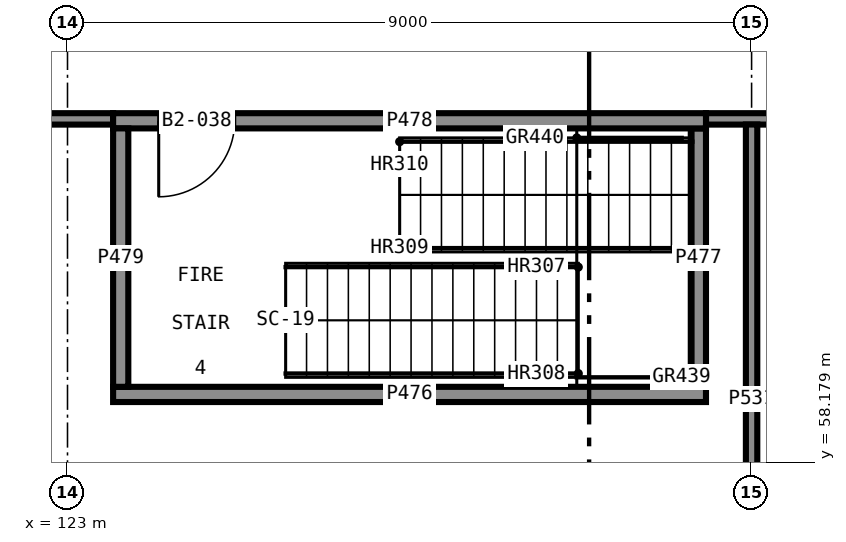
"""IFC4 building model, lengths in metres.
Left out: names, types, materials, properties, quantities, classifications, styles, units other than length and angle.
Written with IfcOpenShell. Run it as: python <this file> out.ifc"""

import sys

from ifc_helpers import new_model, si_unit, direction, frame, frame_2d, origin, place, context, subcontext, project, spatial, rectangle, extrude, element, fill, save


model = new_model("IFC4")
c1 = context("Model", 3, precision=1e-05, world=origin(), true_north=direction((0.0, 1.0)))
c2 = subcontext(c1, "Body", "Model", "MODEL_VIEW")
j1 = project(units=[si_unit("LENGTHUNIT", "METRE"), si_unit("PLANEANGLEUNIT", "RADIAN")], contexts=[c1])
p1 = place(None, origin())
s1 = spatial("IfcSite", under=j1, at=p1, CompositionType="ELEMENT")
p2 = place(p1, origin())
s2 = spatial("IfcBuilding", under=s1, at=p2, CompositionType="ELEMENT")
p3 = place(p2, frame((0.0, 0.0, -10.0)))
s3 = spatial("IfcBuildingStorey", under=s2, at=p3, CompositionType="ELEMENT", Elevation=-10.0)
p4 = place(p3, frame((123.6, 59.075, 0.0), z_axis=(0.0, 0.0, 1.0), x_axis=(1.0, 0.0, 0.0)))
e1 = element("IfcWall", 1, at=p4, inside=s3, PredefinedType="SHEAR", context=c2, shape_type="SweptSolid", body=[
    extrude(rectangle(XDim=7.8, YDim=0.2, at=frame_2d((3.9, 0.0))), origin(), (0.0, 0.0, 1.0), 4.7),
])
p5 = place(p3, frame((131.3, 59.175, 0.0), z_axis=(0.0, 0.0, 1.0), x_axis=(0.0, 1.0, 0.0)))
e2 = element("IfcWall", 2, at=p5, inside=s3, PredefinedType="SHEAR", context=c2, shape_type="SweptSolid", body=[
    extrude(rectangle(XDim=3.4, YDim=0.2, at=frame_2d((1.7, 0.0))), origin(), (0.0, 0.0, 1.0), 4.7),
])
p6 = place(p3, frame((131.4, 62.675, 0.0), z_axis=(0.0, 0.0, 1.0), x_axis=(-1.0, 0.0, 0.0)))
e3 = element("IfcWall", 3, at=p6, inside=s3, PredefinedType="SHEAR", context=c2, shape_type="SweptSolid", body=[
    extrude(rectangle(XDim=7.8, YDim=0.2, at=frame_2d((3.9, 0.0))), origin(), (0.0, 0.0, 1.0), 4.7),
])
p7 = place(p6, frame((6.2, 0.0, 0.0)))
e4 = element("IfcOpeningElement", 4, at=p7, cuts=e3, PredefinedType="OPENING", context=c2, shape_type="SweptSolid", body=[
    extrude(rectangle(XDim=1.0, YDim=2.1, at=frame_2d((0.5, 1.05))), frame((0.0, 0.11, 0.0), z_axis=(0.0, -1.0, 0.0), x_axis=(1.0, 0.0, 0.0)), (0.0, 0.0, 1.0), 0.22),
])
p8 = place(p3, frame((123.7, 62.575, 0.0), z_axis=(0.0, 0.0, 1.0), x_axis=(0.0, -1.0, 0.0)))
e5 = element("IfcWall", 5, at=p8, inside=s3, PredefinedType="SHEAR", context=c2, shape_type="SweptSolid", body=[
    extrude(rectangle(XDim=3.4, YDim=0.2, at=frame_2d((1.7, 0.0))), origin(), (0.0, 0.0, 1.0), 4.7),
])
p9 = place(p3, frame((123.6, 62.7, 0.0), z_axis=(0.0, 0.0, 1.0), x_axis=(-1.0, 0.0, 0.0)))
e6 = element("IfcWall", 6, at=p9, inside=s3, PredefinedType="PARTITIONING", context=c2, shape_type="SweptSolid", body=[
    extrude(rectangle(XDim=2.825, YDim=0.15, at=frame_2d((1.413, 0.0))), origin(), (0.0, 0.0, 1.0), 4.7),
])
p10 = place(p3, frame((143.225, 62.7, 0.0), z_axis=(0.0, 0.0, 1.0), x_axis=(-1.0, 0.0, 0.0)))
e7 = element("IfcWall", 7, at=p10, inside=s3, PredefinedType="PARTITIONING", context=c2, shape_type="SweptSolid", body=[
    extrude(rectangle(XDim=11.825, YDim=0.15, at=frame_2d((5.913, 0.0))), origin(), (0.0, 0.0, 1.0), 4.7),
])
p11 = place(p3, frame((132.0, 55.399, 0.0), z_axis=(0.0, 0.0, 1.0), x_axis=(0.0, 1.0, 0.0)))
e8 = element("IfcWall", 8, at=p11, inside=s3, PredefinedType="PARTITIONING", context=c2, shape_type="SweptSolid", body=[
    extrude(rectangle(XDim=7.227, YDim=0.15, at=frame_2d((3.614, 0.0))), origin(), (0.0, 0.0, 1.0), 3.8),
])
p12 = place(p7, origin())
e9 = element("IfcDoor", 9, at=p12, inside=s3, OperationType="SINGLE_SWING_LEFT", PredefinedType="DOOR", context=c2, shape_type="SweptSolid", body=[
    extrude(rectangle(XDim=1.0, YDim=2.1, at=frame_2d((0.5, 1.05))), frame((0.0, 0.025, 0.0), z_axis=(0.0, -1.0, 0.0), x_axis=(1.0, 0.0, 0.0)), (0.0, 0.0, 1.0), 0.05),
])
fill(e4, e9)
save(model, sys.argv[1])
